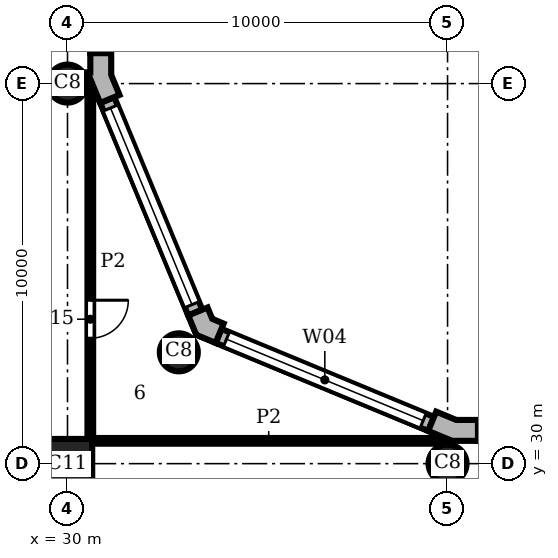
"""IFC4 building model, lengths in metres.
Left out: names, types, materials, properties, quantities, classifications, styles, units other than length and angle.
Written with IfcOpenShell. Run it as: python <this file> out.ifc"""

import sys

from ifc_helpers import new_model, si_unit, direction, frame, frame_2d, origin, origin_2d, place, context, subcontext, project, spatial, polyline, rectangle, circle, outline, extrude, element, fill, save


model = new_model("IFC4")
c1 = context("Model", 3, precision=1e-05, world=origin(), true_north=direction((0.0, 1.0)))
c2 = subcontext(c1, "Body", "Model", "MODEL_VIEW")
j1 = project(units=[si_unit("LENGTHUNIT", "METRE"), si_unit("PLANEANGLEUNIT", "RADIAN")], contexts=[c1])
p1 = place(None, origin())
s1 = spatial("IfcSite", under=j1, at=p1, CompositionType="ELEMENT")
p2 = place(p1, origin())
s2 = spatial("IfcBuilding", under=s1, at=p2, CompositionType="ELEMENT")
p3 = place(p2, frame((0.0, 0.0, 209.7)))
s3 = spatial("IfcBuildingStorey", under=s2, at=p3, CompositionType="ELEMENT", Elevation=209.7)
for number, where, z_axis, x_axis in (
    (1, (40.0, 30.0, 0.0), (0.0, 0.0, 1.0), (1.0, 0.0, 0.0)),
    (2, (32.929, 32.929, 0.0), (0.0, 0.0, 1.0), (1.0, 0.0, 0.0)),
    (3, (30.0, 40.0, 0.0), (0.0, 0.0, 1.0), (1.0, 0.0, 0.0)),
):
    element("IfcColumn", number, at=place(p3, frame(where, z_axis=z_axis, x_axis=x_axis)), inside=s3, PredefinedType="COLUMN", context=c2, shape_type="SweptSolid", body=[
        extrude(circle(Radius=0.5, at=origin_2d()), origin(), (0.0, 0.0, 1.0), 3.9),
    ])
p4 = place(p3, frame((30.0, 30.0, 0.0), z_axis=(0.0, 0.0, 1.0), x_axis=(1.0, 0.0, 0.0)))
e4 = element("IfcColumn", 4, at=p4, inside=s3, PredefinedType="COLUMN", context=c2, shape_type="SweptSolid", body=[
    extrude(rectangle(XDim=1.3, YDim=1.3, at=origin_2d()), origin(), (0.0, 0.0, 1.0), 3.9),
])
p5 = place(p3, origin())
e5 = element("IfcWall", 5, at=p5, inside=s3, PredefinedType="SOLIDWALL", context=c2, shape_type="SweptSolid", body=[
    extrude(outline(polyline([(40.8, 31.0), (40.8, 31.15), (40.229, 31.15), (39.701, 31.369), (39.644, 31.23), (39.49, 30.861), (40.119, 30.6), (40.8, 30.6), (40.8, 31.0)])), origin(), (0.0, 0.0, 1.0), 3.9),
])
e6 = element("IfcWall", 6, at=p5, inside=s3, PredefinedType="SOLIDWALL", context=c2, shape_type="SweptSolid", body=[
    extrude(outline(polyline([(34.051, 33.547), (34.108, 33.685), (33.809, 33.809), (33.685, 34.108), (33.547, 34.051), (33.177, 33.898), (33.388, 33.388), (33.898, 33.177), (34.051, 33.547)])), origin(), (0.0, 0.0, 1.0), 3.9),
])
e7 = element("IfcWall", 7, at=p5, inside=s3, PredefinedType="SOLIDWALL", context=c2, shape_type="SweptSolid", body=[
    extrude(outline(polyline([(30.62, 39.995), (30.62, 40.071), (30.861, 39.49), (31.23, 39.644), (31.369, 39.701), (31.15, 40.229), (31.15, 40.8), (31.0, 40.8), (30.6, 40.8), (30.6, 40.295), (30.5, 40.295), (30.5, 39.995), (30.62, 39.995)])), origin(), (0.0, 0.0, 1.0), 3.9),
])
p6 = place(p3, frame((59.2, 30.8, 0.0), z_axis=(0.0, 0.0, 1.0), x_axis=(-1.0, 0.0, 0.0)))
e8 = element("IfcWall", 8, at=p6, inside=s3, PredefinedType="SOLIDWALL", context=c2, shape_type="SweptSolid", body=[
    extrude(rectangle(XDim=18.4, YDim=0.4, at=frame_2d((9.2, 0.0))), origin(), (0.0, 0.0, 1.0), 3.9),
])
p7 = place(p6, frame((0.2, 0.0, 0.9)))
e9 = element("IfcOpeningElement", 9, at=p7, cuts=e8, PredefinedType="OPENING", context=c2, shape_type="SweptSolid", body=[
    extrude(rectangle(XDim=8.0, YDim=2.35, at=frame_2d((4.0, 1.175))), frame((0.0, 0.21, 0.0), z_axis=(0.0, -1.0, 0.0), x_axis=(1.0, 0.0, 0.0)), (0.0, 0.0, 1.0), 0.42),
])
p8 = place(p6, frame((10.2, 0.0, 0.9)))
e10 = element("IfcOpeningElement", 10, at=p8, cuts=e8, PredefinedType="OPENING", context=c2, shape_type="SweptSolid", body=[
    extrude(rectangle(XDim=8.0, YDim=2.35, at=frame_2d((4.0, 1.175))), frame((0.0, 0.21, 0.0), z_axis=(0.0, -1.0, 0.0), x_axis=(1.0, 0.0, 0.0)), (0.0, 0.0, 1.0), 0.42),
])
p9 = place(p3, frame((39.567, 31.045, 0.0), z_axis=(0.0, 0.0, 1.0), x_axis=(-0.923891000409, 0.382655745237, 0.0)))
e11 = element("IfcWall", 11, at=p9, inside=s3, PredefinedType="SOLIDWALL", context=c2, shape_type="SweptSolid", body=[
    extrude(rectangle(XDim=6.053, YDim=0.4, at=frame_2d((3.027, 0.0))), origin(), (0.0, 0.0, 1.0), 3.9),
])
p10 = place(p9, frame((0.227, 0.0, 0.9)))
e12 = element("IfcOpeningElement", 12, at=p10, cuts=e11, PredefinedType="OPENING", context=c2, shape_type="SweptSolid", body=[
    extrude(rectangle(XDim=5.6, YDim=2.35, at=frame_2d((2.8, 1.175))), frame((0.0, 0.21, 0.0), z_axis=(0.0, -1.0, 0.0), x_axis=(1.0, 0.0, 0.0)), (0.0, 0.0, 1.0), 0.42),
])
p11 = place(p3, frame((33.362, 33.974, 0.0), z_axis=(0.0, 0.0, 1.0), x_axis=(-0.382655745237, 0.923891000409, 0.0)))
e13 = element("IfcWall", 13, at=p11, inside=s3, PredefinedType="SOLIDWALL", context=c2, shape_type="SweptSolid", body=[
    extrude(rectangle(XDim=6.053, YDim=0.4, at=frame_2d((3.027, 0.0))), origin(), (0.0, 0.0, 1.0), 3.9),
])
p12 = place(p11, frame((0.227, 0.0, 0.9)))
e14 = element("IfcOpeningElement", 14, at=p12, cuts=e13, PredefinedType="OPENING", context=c2, shape_type="SweptSolid", body=[
    extrude(rectangle(XDim=5.6, YDim=2.35, at=frame_2d((2.8, 1.175))), frame((0.0, 0.21, 0.0), z_axis=(0.0, -1.0, 0.0), x_axis=(1.0, 0.0, 0.0)), (0.0, 0.0, 1.0), 0.42),
])
p13 = place(p3, frame((30.8, 40.8, 0.0), z_axis=(0.0, 0.0, 1.0), x_axis=(0.0, 1.0, 0.0)))
e15 = element("IfcWall", 15, at=p13, inside=s3, PredefinedType="SOLIDWALL", context=c2, shape_type="SweptSolid", body=[
    extrude(rectangle(XDim=18.4, YDim=0.4, at=frame_2d((9.2, 0.0))), origin(), (0.0, 0.0, 1.0), 3.9),
])
p14 = place(p13, frame((0.2, 0.0, 0.9)))
e16 = element("IfcOpeningElement", 16, at=p14, cuts=e15, PredefinedType="OPENING", context=c2, shape_type="SweptSolid", body=[
    extrude(rectangle(XDim=8.0, YDim=2.35, at=frame_2d((4.0, 1.175))), frame((0.0, 0.21, 0.0), z_axis=(0.0, -1.0, 0.0), x_axis=(1.0, 0.0, 0.0)), (0.0, 0.0, 1.0), 0.42),
])
p15 = place(p13, frame((10.2, 0.0, 0.9)))
e17 = element("IfcOpeningElement", 17, at=p15, cuts=e15, PredefinedType="OPENING", context=c2, shape_type="SweptSolid", body=[
    extrude(rectangle(XDim=8.0, YDim=2.35, at=frame_2d((4.0, 1.175))), frame((0.0, 0.21, 0.0), z_axis=(0.0, -1.0, 0.0), x_axis=(1.0, 0.0, 0.0)), (0.0, 0.0, 1.0), 0.42),
])
p16 = place(p3, frame((30.6, 30.65, 0.0), z_axis=(0.0, 0.0, 1.0), x_axis=(0.0, 1.0, 0.0)))
e18 = element("IfcWall", 18, at=p16, inside=s3, PredefinedType="PARTITIONING", context=c2, shape_type="SweptSolid", body=[
    extrude(rectangle(XDim=9.288, YDim=0.15, at=frame_2d((4.644, 0.0))), origin(), (0.0, 0.0, 1.0), 3.58),
])
p17 = place(p16, frame((2.65, 0.0, 0.0)))
e19 = element("IfcOpeningElement", 19, at=p17, cuts=e18, PredefinedType="OPENING", context=c2, shape_type="SweptSolid", body=[
    extrude(rectangle(XDim=1.0, YDim=2.1, at=frame_2d((0.5, 1.05))), frame((0.0, 0.085, 0.0), z_axis=(0.0, -1.0, 0.0), x_axis=(1.0, 0.0, 0.0)), (0.0, 0.0, 1.0), 0.17),
])
p18 = place(p3, frame((30.65, 30.6, 0.0), z_axis=(0.0, 0.0, 1.0), x_axis=(1.0, 0.0, 0.0)))
e20 = element("IfcWall", 20, at=p18, inside=s3, PredefinedType="PARTITIONING", context=c2, shape_type="SweptSolid", body=[
    extrude(rectangle(XDim=9.288, YDim=0.15, at=frame_2d((4.644, 0.0))), origin(), (0.0, 0.0, 1.0), 3.58),
])
p19 = place(p10, origin())
e21 = element("IfcWindow", 21, at=p19, inside=s3, PartitioningType="SINGLE_PANEL", PredefinedType="WINDOW", context=c2, shape_type="SweptSolid", body=[
    extrude(rectangle(XDim=5.6, YDim=2.35, at=frame_2d((2.8, 1.175))), frame((0.0, 0.16, 0.0), z_axis=(0.0, -1.0, 0.0), x_axis=(1.0, 0.0, 0.0)), (0.0, 0.0, 1.0), 0.06),
])
fill(e12, e21)
p20 = place(p12, origin())
e22 = element("IfcWindow", 22, at=p20, inside=s3, PartitioningType="SINGLE_PANEL", PredefinedType="WINDOW", context=c2, shape_type="SweptSolid", body=[
    extrude(rectangle(XDim=5.6, YDim=2.35, at=frame_2d((2.8, 1.175))), frame((0.0, 0.16, 0.0), z_axis=(0.0, -1.0, 0.0), x_axis=(1.0, 0.0, 0.0)), (0.0, 0.0, 1.0), 0.06),
])
fill(e14, e22)
p21 = place(p17, frame((1.0, 0.0, 0.0), z_axis=(0.0, 0.0, 1.0), x_axis=(-1.0, 0.0, 0.0)))
e23 = element("IfcDoor", 23, at=p21, inside=s3, OperationType="SINGLE_SWING_LEFT", PredefinedType="DOOR", context=c2, shape_type="SweptSolid", body=[
    extrude(rectangle(XDim=1.0, YDim=2.1, at=frame_2d((0.5, 1.05))), frame((0.0, 0.025, 0.0), z_axis=(0.0, -1.0, 0.0), x_axis=(1.0, 0.0, 0.0)), (0.0, 0.0, 1.0), 0.05),
])
fill(e19, e23)
save(model, sys.argv[1])
